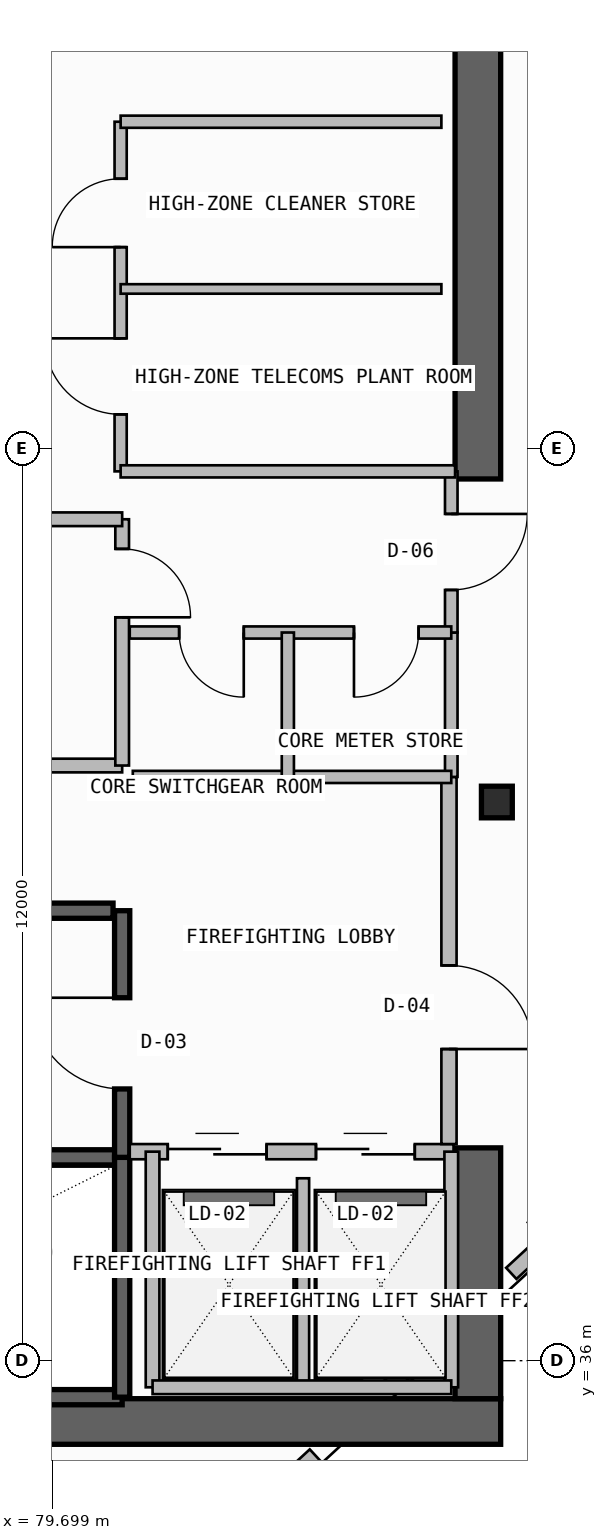
"""IFC4 building model, lengths in metres.
Left out: names, types, materials, properties, quantities, classifications, styles, units other than length and angle.
Written with IfcOpenShell. Run it as: python <this file> out.ifc"""

import sys

from ifc_helpers import new_model, si_unit, direction, frame, frame_2d, origin, origin_2d, place, context, subcontext, project, spatial, rectangle, i_section, extrude, element, fill, save


model = new_model("IFC4")
c1 = context("Model", 3, precision=1e-05, world=origin(), true_north=direction((0.0, 1.0)))
c2 = subcontext(c1, "Body", "Model", "MODEL_VIEW")
j1 = project(units=[si_unit("LENGTHUNIT", "METRE"), si_unit("PLANEANGLEUNIT", "RADIAN")], contexts=[c1])
p1 = place(None, origin())
s1 = spatial("IfcSite", under=j1, at=p1, CompositionType="ELEMENT")
p2 = place(p1, origin())
s2 = spatial("IfcBuilding", under=s1, at=p2, CompositionType="ELEMENT")
p3 = place(p2, frame((0.0, 0.0, 307.78)))
s3 = spatial("IfcBuildingStorey", under=s2, at=p3, CompositionType="ELEMENT", Elevation=307.78)
p4 = place(p3, frame((72.3, 35.2, -0.2), z_axis=(0.0, 0.0, 1.0), x_axis=(1.0, 0.0, 0.0)))
e1 = element("IfcWall", 1, at=p4, inside=s3, PredefinedType="SHEAR", context=c2, shape_type="SweptSolid", body=[
    extrude(rectangle(XDim=13.3, YDim=0.6, at=frame_2d((6.65, 0.0))), origin(), (0.0, 0.0, 1.0), 4.8),
])
p5 = place(p3, frame((85.3, 35.5, -0.2), z_axis=(0.0, 0.0, 1.0), x_axis=(0.0, 1.0, 0.0)))
e2 = element("IfcWall", 2, at=p5, inside=s3, PredefinedType="SHEAR", context=c2, shape_type="SweptSolid", body=[
    extrude(rectangle(XDim=3.3, YDim=0.6, at=frame_2d((1.65, 0.0))), origin(), (0.0, 0.0, 1.0), 4.8),
])
p6 = place(p3, frame((85.3, 47.6, -0.2), z_axis=(0.0, 0.0, 1.0), x_axis=(0.0, 1.0, 0.0)))
e3 = element("IfcWall", 3, at=p6, inside=s3, PredefinedType="SHEAR", context=c2, shape_type="SweptSolid", body=[
    extrude(rectangle(XDim=8.45, YDim=0.6, at=frame_2d((4.225, 0.0))), origin(), (0.0, 0.0, 1.0), 4.8),
])
p7 = place(p3, frame((85.55, 43.35, 0.0), z_axis=(0.0, 0.0, 1.0), x_axis=(1.0, 0.0, 0.0)))
e4 = element("IfcColumn", 4, at=p7, inside=s3, PredefinedType="COLUMN", context=c2, shape_type="SweptSolid", body=[
    extrude(i_section(OverallWidth=0.406, OverallDepth=0.416, WebThickness=0.03, FlangeThickness=0.048, FilletRadius=0.015, at=origin_2d()), origin(), (0.0, 0.0, 1.0), 4.8),
])
p8 = place(p3, frame((86.192, 37.566, 0.0), z_axis=(0.0, 0.0, 1.0), x_axis=(-0.734346728958, -0.678774544064, 0.0)))
e5 = element("IfcWall", 5, at=p8, inside=s3, PredefinedType="PARAPET", context=c2, shape_type="SweptSolid", body=[
    extrude(rectangle(XDim=0.615, YDim=0.2, at=frame_2d((0.308, 0.0))), origin(), (0.0, 0.0, 1.0), 1.15),
])
p9 = place(p3, frame((84.86, 36.335, 0.0), z_axis=(0.0, 0.0, 1.0), x_axis=(-0.734337093013, -0.678784968768, 0.0)))
e6 = element("IfcWall", 6, at=p9, inside=s3, PredefinedType="PARAPET", context=c2, shape_type="SweptSolid", body=[
    extrude(rectangle(XDim=1.024, YDim=0.2, at=frame_2d((0.512, 0.0))), origin(), (0.0, 0.0, 1.0), 1.15),
])
p10 = place(p3, frame((83.156, 34.76, 0.0), z_axis=(0.0, 0.0, 1.0), x_axis=(-0.734364355784, -0.678755473609, 0.0)))
e7 = element("IfcWall", 7, at=p10, inside=s3, PredefinedType="PARAPET", context=c2, shape_type="SweptSolid", body=[
    extrude(rectangle(XDim=1.045, YDim=0.2, at=frame_2d((0.522, 0.0))), origin(), (0.0, 0.0, 1.0), 1.15),
])
for number, where, z_axis, x_axis in (
    (8, (72.92, 35.52, -0.2), (0.0, 0.0, 1.0), (1.0, 0.0, 0.0)),
    (9, (72.92, 38.675, -0.2), (0.0, 0.0, 1.0), (1.0, 0.0, 0.0)),
):
    element("IfcWall", number, at=place(p3, frame(where, z_axis=z_axis, x_axis=x_axis)), inside=s3, PredefinedType="SOLIDWALL", context=c2, shape_type="SweptSolid", body=[
        extrude(rectangle(XDim=7.7, YDim=0.2, at=frame_2d((3.85, 0.0))), origin(), (0.0, 0.0, 1.0), 4.8),
    ])
p11 = place(p3, frame((80.62, 35.52, -0.2), z_axis=(0.0, 0.0, 1.0), x_axis=(0.0, 1.0, 0.0)))
e10 = element("IfcWall", 10, at=p11, inside=s3, PredefinedType="SOLIDWALL", context=c2, shape_type="SweptSolid", body=[
    extrude(rectangle(XDim=3.155, YDim=0.2, at=frame_2d((1.578, 0.0))), origin(), (0.0, 0.0, 1.0), 4.8),
])
p12 = place(p3, frame((80.62, 38.675, -0.2), z_axis=(0.0, 0.0, 1.0), x_axis=(0.0, 1.0, 0.0)))
e11 = element("IfcWall", 11, at=p12, inside=s3, PredefinedType="SOLIDWALL", context=c2, shape_type="SweptSolid", body=[
    extrude(rectangle(XDim=3.245, YDim=0.2, at=frame_2d((1.623, 0.0))), origin(), (0.0, 0.0, 1.0), 4.8),
])
p13 = place(p12, frame((0.9, 0.0, 0.2)))
e12 = element("IfcOpeningElement", 12, at=p13, cuts=e11, PredefinedType="OPENING", context=c2, shape_type="SweptSolid", body=[
    extrude(rectangle(XDim=1.2, YDim=2.2, at=frame_2d((0.6, 1.1))), frame((0.0, 0.11, 0.0), z_axis=(0.0, -1.0, 0.0), x_axis=(1.0, 0.0, 0.0)), (0.0, 0.0, 1.0), 0.22),
])
p14 = place(p3, frame((80.72, 38.75, 0.0), z_axis=(0.0, 0.0, 1.0), x_axis=(1.0, 0.0, 0.0)))
e13 = element("IfcWall", 13, at=p14, inside=s3, PredefinedType="SOLIDWALL", context=c2, shape_type="SweptSolid", body=[
    extrude(rectangle(XDim=4.26, YDim=0.2, at=frame_2d((2.13, 0.0))), origin(), (0.0, 0.0, 1.0), 4.6),
])
p15 = place(p14, frame((0.5, 0.0, 0.0)))
e14 = element("IfcOpeningElement", 14, at=p15, cuts=e13, PredefinedType="OPENING", context=c2, shape_type="SweptSolid", body=[
    extrude(rectangle(XDim=1.3, YDim=2.3, at=frame_2d((0.65, 1.15))), frame((0.0, 0.11, 0.0), z_axis=(0.0, -1.0, 0.0), x_axis=(1.0, 0.0, 0.0)), (0.0, 0.0, 1.0), 0.22),
])
p16 = place(p14, frame((2.45, 0.0, 0.0)))
e15 = element("IfcOpeningElement", 15, at=p16, cuts=e13, PredefinedType="OPENING", context=c2, shape_type="SweptSolid", body=[
    extrude(rectangle(XDim=1.3, YDim=2.3, at=frame_2d((0.65, 1.15))), frame((0.0, 0.11, 0.0), z_axis=(0.0, -1.0, 0.0), x_axis=(1.0, 0.0, 0.0)), (0.0, 0.0, 1.0), 0.22),
])
p17 = place(p3, frame((83.0, 35.65, 0.0), z_axis=(0.0, 0.0, 1.0), x_axis=(0.0, 1.0, 0.0)))
e16 = element("IfcWall", 16, at=p17, inside=s3, PredefinedType="PLUMBINGWALL", context=c2, shape_type="SweptSolid", body=[
    extrude(rectangle(XDim=2.75, YDim=0.16, at=frame_2d((1.375, 0.0))), origin(), (0.0, 0.0, 1.0), 4.6),
])
for number, where, z_axis, x_axis in (
    (17, (84.95, 35.65, 0.0), (0.0, 0.0, 1.0), (0.0, 1.0, 0.0)),
    (18, (81.02, 35.65, 0.0), (0.0, 0.0, 1.0), (0.0, 1.0, 0.0)),
):
    element("IfcWall", number, at=place(p3, frame(where, z_axis=z_axis, x_axis=x_axis)), inside=s3, PredefinedType="SOLIDWALL", context=c2, shape_type="SweptSolid", body=[
        extrude(rectangle(XDim=3.1, YDim=0.18, at=frame_2d((1.55, 0.0))), origin(), (0.0, 0.0, 1.0), 4.6),
    ])
p18 = place(p3, frame((81.02, 35.65, 0.0), z_axis=(0.0, 0.0, 1.0), x_axis=(1.0, 0.0, 0.0)))
e19 = element("IfcWall", 19, at=p18, inside=s3, PredefinedType="SOLIDWALL", context=c2, shape_type="SweptSolid", body=[
    extrude(rectangle(XDim=3.93, YDim=0.18, at=frame_2d((1.965, 0.0))), origin(), (0.0, 0.0, 1.0), 4.6),
])
p19 = place(p3, frame((84.92, 38.85, 0.0), z_axis=(0.0, 0.0, 1.0), x_axis=(0.0, 1.0, 0.0)))
e20 = element("IfcWall", 20, at=p19, inside=s3, PredefinedType="SOLIDWALL", context=c2, shape_type="SweptSolid", body=[
    extrude(rectangle(XDim=4.83, YDim=0.2, at=frame_2d((2.415, 0.0))), origin(), (0.0, 0.0, 1.0), 4.6),
])
p20 = place(p19, frame((1.25, 0.0, 0.0)))
e21 = element("IfcOpeningElement", 21, at=p20, cuts=e20, PredefinedType="OPENING", context=c2, shape_type="SweptSolid", body=[
    extrude(rectangle(XDim=1.1, YDim=2.2, at=frame_2d((0.55, 1.1))), frame((0.0, 0.11, 0.0), z_axis=(0.0, -1.0, 0.0), x_axis=(1.0, 0.0, 0.0)), (0.0, 0.0, 1.0), 0.22),
])
p21 = place(p3, frame((72.92, 41.92, -0.2), z_axis=(0.0, 0.0, 1.0), x_axis=(1.0, 0.0, 0.0)))
e22 = element("IfcWall", 22, at=p21, inside=s3, PredefinedType="SOLIDWALL", context=c2, shape_type="SweptSolid", body=[
    extrude(rectangle(XDim=7.58, YDim=0.2, at=frame_2d((3.79, 0.0))), origin(), (0.0, 0.0, 1.0), 4.8),
])
p22 = place(p3, frame((72.92, 43.83, 0.0), z_axis=(0.0, 0.0, 1.0), x_axis=(1.0, 0.0, 0.0)))
e23 = element("IfcWall", 23, at=p22, inside=s3, PredefinedType="PLUMBINGWALL", context=c2, shape_type="SweptSolid", body=[
    extrude(rectangle(XDim=7.7, YDim=0.18, at=frame_2d((3.85, 0.0))), origin(), (0.0, 0.0, 1.0), 4.6),
])
p23 = place(p3, frame((80.62, 43.83, 0.0), z_axis=(0.0, 0.0, 1.0), x_axis=(0.0, 1.0, 0.0)))
e24 = element("IfcWall", 24, at=p23, inside=s3, PredefinedType="PLUMBINGWALL", context=c2, shape_type="SweptSolid", body=[
    extrude(rectangle(XDim=3.24, YDim=0.18, at=frame_2d((1.62, 0.0))), origin(), (0.0, 0.0, 1.0), 4.6),
])
p24 = place(p23, frame((1.95, 0.0, 0.0)))
e25 = element("IfcOpeningElement", 25, at=p24, cuts=e24, PredefinedType="OPENING", context=c2, shape_type="SweptSolid", body=[
    extrude(rectangle(XDim=0.9, YDim=2.1, at=frame_2d((0.45, 1.05))), frame((0.0, 0.1, 0.0), z_axis=(0.0, -1.0, 0.0), x_axis=(1.0, 0.0, 0.0)), (0.0, 0.0, 1.0), 0.2),
])
p25 = place(p3, frame((72.92, 47.07, 0.0), z_axis=(0.0, 0.0, 1.0), x_axis=(1.0, 0.0, 0.0)))
e26 = element("IfcWall", 26, at=p25, inside=s3, PredefinedType="PLUMBINGWALL", context=c2, shape_type="SweptSolid", body=[
    extrude(rectangle(XDim=7.7, YDim=0.18, at=frame_2d((3.85, 0.0))), origin(), (0.0, 0.0, 1.0), 4.6),
])
p26 = place(p3, frame((84.95, 43.68, 0.0), z_axis=(0.0, 0.0, 1.0), x_axis=(0.0, 1.0, 0.0)))
e27 = element("IfcWall", 27, at=p26, inside=s3, PredefinedType="PLUMBINGWALL", context=c2, shape_type="SweptSolid", body=[
    extrude(rectangle(XDim=1.9, YDim=0.165, at=frame_2d((0.95, 0.0))), origin(), (0.0, 0.0, 1.0), 4.6),
])
p27 = place(p3, frame((84.95, 45.58, 0.0), z_axis=(0.0, 0.0, 1.0), x_axis=(0.0, 1.0, 0.0)))
e28 = element("IfcWall", 28, at=p27, inside=s3, PredefinedType="PARTITIONING", context=c2, shape_type="SweptSolid", body=[
    extrude(rectangle(XDim=2.12, YDim=0.165, at=frame_2d((1.06, 0.0))), origin(), (0.0, 0.0, 1.0), 4.6),
])
p28 = place(p27, frame((0.56, 0.0, 0.0)))
e29 = element("IfcOpeningElement", 29, at=p28, cuts=e28, PredefinedType="OPENING", context=c2, shape_type="SweptSolid", body=[
    extrude(rectangle(XDim=1.0, YDim=2.2, at=frame_2d((0.5, 1.1))), frame((0.0, 0.093, 0.0), z_axis=(0.0, -1.0, 0.0), x_axis=(1.0, 0.0, 0.0)), (0.0, 0.0, 1.0), 0.185),
])
p29 = place(p3, frame((80.72, 45.58, 0.0), z_axis=(0.0, 0.0, 1.0), x_axis=(1.0, 0.0, 0.0)))
e30 = element("IfcWall", 30, at=p29, inside=s3, PredefinedType="PLUMBINGWALL", context=c2, shape_type="SweptSolid", body=[
    extrude(rectangle(XDim=4.23, YDim=0.16, at=frame_2d((2.115, 0.0))), origin(), (0.0, 0.0, 1.0), 4.6),
])
p30 = place(p29, frame((0.65, 0.0, 0.0)))
e31 = element("IfcOpeningElement", 31, at=p30, cuts=e30, PredefinedType="OPENING", context=c2, shape_type="SweptSolid", body=[
    extrude(rectangle(XDim=0.85, YDim=2.05, at=frame_2d((0.425, 1.025))), frame((0.0, 0.09, 0.0), z_axis=(0.0, -1.0, 0.0), x_axis=(1.0, 0.0, 0.0)), (0.0, 0.0, 1.0), 0.18),
])
p31 = place(p29, frame((2.95, 0.0, 0.0)))
e32 = element("IfcOpeningElement", 32, at=p31, cuts=e30, PredefinedType="OPENING", context=c2, shape_type="SweptSolid", body=[
    extrude(rectangle(XDim=0.85, YDim=2.05, at=frame_2d((0.425, 1.025))), frame((0.0, 0.09, 0.0), z_axis=(0.0, -1.0, 0.0), x_axis=(1.0, 0.0, 0.0)), (0.0, 0.0, 1.0), 0.18),
])
p32 = place(p3, frame((80.76, 43.68, 0.0), z_axis=(0.0, 0.0, 1.0), x_axis=(1.0, 0.0, 0.0)))
e33 = element("IfcWall", 33, at=p32, inside=s3, PredefinedType="PLUMBINGWALL", context=c2, shape_type="SweptSolid", body=[
    extrude(rectangle(XDim=4.19, YDim=0.16, at=frame_2d((2.095, 0.0))), origin(), (0.0, 0.0, 1.0), 4.6),
])
p33 = place(p3, frame((82.8, 43.68, 0.0), z_axis=(0.0, 0.0, 1.0), x_axis=(0.0, 1.0, 0.0)))
e34 = element("IfcWall", 34, at=p33, inside=s3, PredefinedType="PLUMBINGWALL", context=c2, shape_type="SweptSolid", body=[
    extrude(rectangle(XDim=1.9, YDim=0.16, at=frame_2d((0.95, 0.0))), origin(), (0.0, 0.0, 1.0), 4.6),
])
p34 = place(p3, frame((80.6, 47.7, 0.0), z_axis=(0.0, 0.0, 1.0), x_axis=(0.0, 1.0, 0.0)))
e35 = element("IfcWall", 35, at=p34, inside=s3, PredefinedType="SOLIDWALL", context=c2, shape_type="SweptSolid", body=[
    extrude(rectangle(XDim=4.6, YDim=0.16, at=frame_2d((2.3, 0.0))), origin(), (0.0, 0.0, 1.0), 4.6),
])
p35 = place(p34, frame((0.75, 0.0, 0.0)))
e36 = element("IfcOpeningElement", 36, at=p35, cuts=e35, PredefinedType="OPENING", context=c2, shape_type="SweptSolid", body=[
    extrude(rectangle(XDim=1.0, YDim=2.2, at=frame_2d((0.5, 1.1))), frame((0.0, 0.09, 0.0), z_axis=(0.0, -1.0, 0.0), x_axis=(1.0, 0.0, 0.0)), (0.0, 0.0, 1.0), 0.18),
])
p36 = place(p34, frame((2.95, 0.0, 0.0)))
e37 = element("IfcOpeningElement", 37, at=p36, cuts=e35, PredefinedType="OPENING", context=c2, shape_type="SweptSolid", body=[
    extrude(rectangle(XDim=0.9, YDim=2.1, at=frame_2d((0.45, 1.05))), frame((0.0, 0.09, 0.0), z_axis=(0.0, -1.0, 0.0), x_axis=(1.0, 0.0, 0.0)), (0.0, 0.0, 1.0), 0.18),
])
p37 = place(p3, frame((80.6, 47.7, 0.0), z_axis=(0.0, 0.0, 1.0), x_axis=(1.0, 0.0, 0.0)))
e38 = element("IfcWall", 38, at=p37, inside=s3, PredefinedType="SOLIDWALL", context=c2, shape_type="SweptSolid", body=[
    extrude(rectangle(XDim=4.4, YDim=0.16, at=frame_2d((2.2, 0.0))), origin(), (0.0, 0.0, 1.0), 4.6),
])
p38 = place(p3, frame((80.6, 52.3, 0.0), z_axis=(0.0, 0.0, 1.0), x_axis=(1.0, 0.0, 0.0)))
e39 = element("IfcWall", 39, at=p38, inside=s3, PredefinedType="SOLIDWALL", context=c2, shape_type="SweptSolid", body=[
    extrude(rectangle(XDim=4.22, YDim=0.16, at=frame_2d((2.11, 0.0))), origin(), (0.0, 0.0, 1.0), 4.6),
])
p39 = place(p3, frame((80.6, 50.1, 0.0), z_axis=(0.0, 0.0, 1.0), x_axis=(1.0, 0.0, 0.0)))
e40 = element("IfcWall", 40, at=p39, inside=s3, PredefinedType="PARTITIONING", context=c2, shape_type="SweptSolid", body=[
    extrude(rectangle(XDim=4.22, YDim=0.125, at=frame_2d((2.11, 0.0))), origin(), (0.0, 0.0, 1.0), 4.6),
])
p40 = place(p13, origin())
e41 = element("IfcDoor", 41, at=p40, inside=s3, OperationType="SINGLE_SWING_RIGHT", PredefinedType="USERDEFINED", context=c2, shape_type="SweptSolid", body=[
    extrude(rectangle(XDim=1.2, YDim=2.2, at=frame_2d((0.6, 1.1))), frame((0.0, 0.025, 0.0), z_axis=(0.0, -1.0, 0.0), x_axis=(1.0, 0.0, 0.0)), (0.0, 0.0, 1.0), 0.05),
])
fill(e12, e41)
p41 = place(p15, origin())
e42 = element("IfcDoor", 42, at=p41, inside=s3, OperationType="DOUBLE_DOOR_SLIDING", PredefinedType="DOOR", context=c2, shape_type="SweptSolid", body=[
    extrude(rectangle(XDim=1.3, YDim=2.3, at=frame_2d((0.65, 1.15))), frame((0.0, 0.025, 0.0), z_axis=(0.0, -1.0, 0.0), x_axis=(1.0, 0.0, 0.0)), (0.0, 0.0, 1.0), 0.05),
])
fill(e14, e42)
p42 = place(p16, origin())
e43 = element("IfcDoor", 43, at=p42, inside=s3, OperationType="DOUBLE_DOOR_SLIDING", PredefinedType="DOOR", context=c2, shape_type="SweptSolid", body=[
    extrude(rectangle(XDim=1.3, YDim=2.3, at=frame_2d((0.65, 1.15))), frame((0.0, 0.025, 0.0), z_axis=(0.0, -1.0, 0.0), x_axis=(1.0, 0.0, 0.0)), (0.0, 0.0, 1.0), 0.05),
])
fill(e15, e43)
p43 = place(p20, frame((1.1, 0.0, 0.0), z_axis=(0.0, 0.0, 1.0), x_axis=(-1.0, 0.0, 0.0)))
e44 = element("IfcDoor", 44, at=p43, inside=s3, OperationType="SINGLE_SWING_RIGHT", PredefinedType="DOOR", context=c2, shape_type="SweptSolid", body=[
    extrude(rectangle(XDim=1.1, YDim=2.2, at=frame_2d((0.55, 1.1))), frame((0.0, 0.025, 0.0), z_axis=(0.0, -1.0, 0.0), x_axis=(1.0, 0.0, 0.0)), (0.0, 0.0, 1.0), 0.05),
])
fill(e21, e44)
p44 = place(p24, frame((0.9, 0.0, 0.0), z_axis=(0.0, 0.0, 1.0), x_axis=(-1.0, 0.0, 0.0)))
e45 = element("IfcDoor", 45, at=p44, inside=s3, OperationType="SINGLE_SWING_RIGHT", PredefinedType="DOOR", context=c2, shape_type="SweptSolid", body=[
    extrude(rectangle(XDim=0.9, YDim=2.1, at=frame_2d((0.45, 1.05))), frame((0.0, 0.025, 0.0), z_axis=(0.0, -1.0, 0.0), x_axis=(1.0, 0.0, 0.0)), (0.0, 0.0, 1.0), 0.05),
])
fill(e25, e45)
p45 = place(p28, frame((1.0, 0.0, 0.0), z_axis=(0.0, 0.0, 1.0), x_axis=(-1.0, 0.0, 0.0)))
e46 = element("IfcDoor", 46, at=p45, inside=s3, OperationType="SINGLE_SWING_LEFT", PredefinedType="DOOR", context=c2, shape_type="SweptSolid", body=[
    extrude(rectangle(XDim=1.0, YDim=2.2, at=frame_2d((0.5, 1.1))), frame((0.0, 0.025, 0.0), z_axis=(0.0, -1.0, 0.0), x_axis=(1.0, 0.0, 0.0)), (0.0, 0.0, 1.0), 0.05),
])
fill(e29, e46)
p46 = place(p30, frame((0.85, 0.0, 0.0), z_axis=(0.0, 0.0, 1.0), x_axis=(-1.0, 0.0, 0.0)))
e47 = element("IfcDoor", 47, at=p46, inside=s3, OperationType="SINGLE_SWING_LEFT", PredefinedType="DOOR", context=c2, shape_type="SweptSolid", body=[
    extrude(rectangle(XDim=0.85, YDim=2.05, at=frame_2d((0.425, 1.025))), frame((0.0, 0.025, 0.0), z_axis=(0.0, -1.0, 0.0), x_axis=(1.0, 0.0, 0.0)), (0.0, 0.0, 1.0), 0.05),
])
fill(e31, e47)
p47 = place(p31, frame((0.85, 0.0, 0.0), z_axis=(0.0, 0.0, 1.0), x_axis=(-1.0, 0.0, 0.0)))
e48 = element("IfcDoor", 48, at=p47, inside=s3, OperationType="SINGLE_SWING_RIGHT", PredefinedType="DOOR", context=c2, shape_type="SweptSolid", body=[
    extrude(rectangle(XDim=0.85, YDim=2.05, at=frame_2d((0.425, 1.025))), frame((0.0, 0.025, 0.0), z_axis=(0.0, -1.0, 0.0), x_axis=(1.0, 0.0, 0.0)), (0.0, 0.0, 1.0), 0.05),
])
fill(e32, e48)
p48 = place(p35, origin())
e49 = element("IfcDoor", 49, at=p48, inside=s3, OperationType="SINGLE_SWING_RIGHT", PredefinedType="DOOR", context=c2, shape_type="SweptSolid", body=[
    extrude(rectangle(XDim=1.0, YDim=2.2, at=frame_2d((0.5, 1.1))), frame((0.0, 0.025, 0.0), z_axis=(0.0, -1.0, 0.0), x_axis=(1.0, 0.0, 0.0)), (0.0, 0.0, 1.0), 0.05),
])
fill(e36, e49)
p49 = place(p36, origin())
e50 = element("IfcDoor", 50, at=p49, inside=s3, OperationType="SINGLE_SWING_LEFT", PredefinedType="DOOR", context=c2, shape_type="SweptSolid", body=[
    extrude(rectangle(XDim=0.9, YDim=2.1, at=frame_2d((0.45, 1.05))), frame((0.0, 0.025, 0.0), z_axis=(0.0, -1.0, 0.0), x_axis=(1.0, 0.0, 0.0)), (0.0, 0.0, 1.0), 0.05),
])
fill(e37, e50)
save(model, sys.argv[1])
